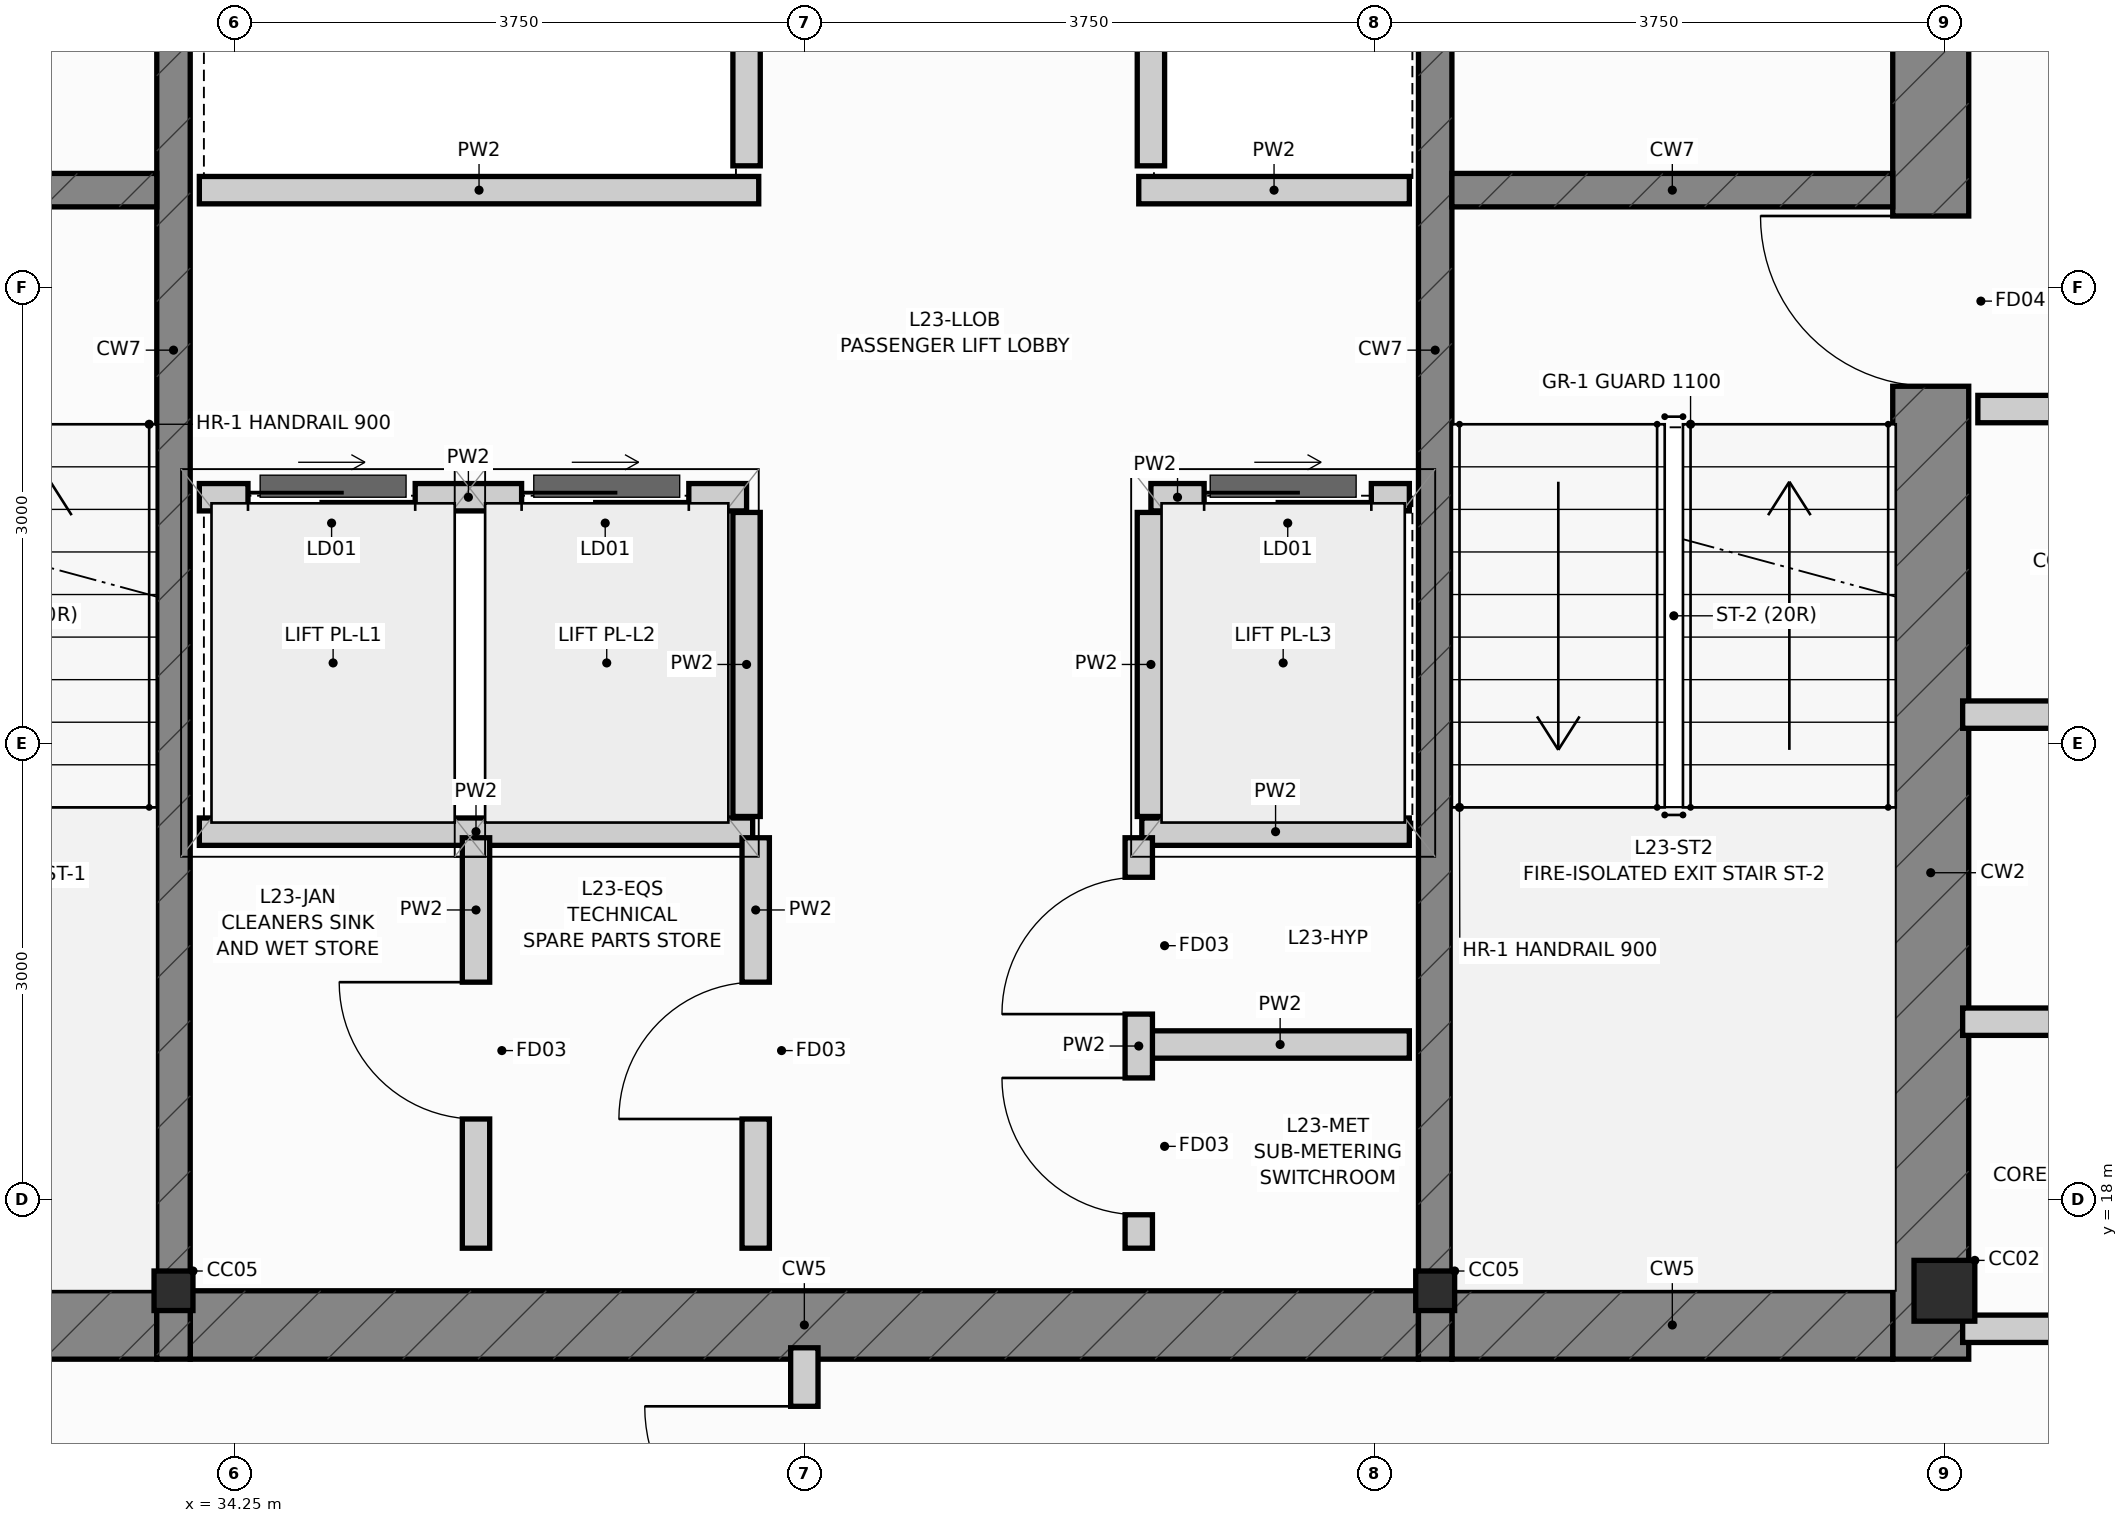
"""IFC4 building model, lengths in metres.
Left out: names, types, materials, properties, quantities, classifications, styles, units other than length and angle.
Written with IfcOpenShell. Run it as: python <this file> out.ifc"""

import sys

from ifc_helpers import new_model, si_unit, direction, frame, frame_2d, origin, origin_2d, place, context, subcontext, project, spatial, rectangle, i_section, extrude, source, transform, mapped, element, fill, save


model = new_model("IFC4")
c1 = context("Model", 3, precision=1e-05, world=origin(), true_north=direction((0.0, 1.0)))
c2 = subcontext(c1, "Body", "Model", "MODEL_VIEW")
j1 = project(units=[si_unit("LENGTHUNIT", "METRE"), si_unit("PLANEANGLEUNIT", "RADIAN")], contexts=[c1])
p1 = place(None, origin())
s1 = spatial("IfcSite", under=j1, at=p1, CompositionType="ELEMENT")
p2 = place(p1, origin())
s2 = spatial("IfcBuilding", under=s1, at=p2, CompositionType="ELEMENT")
p3 = place(p2, frame((0.0, 0.0, 112.7)))
s3 = spatial("IfcBuildingStorey", under=s2, at=p3, CompositionType="ELEMENT", Elevation=112.7)
m1 = source(origin(), c2, "Body", "SweptSolid", [
    extrude(i_section(OverallWidth=0.4, OverallDepth=0.4, WebThickness=0.02, FlangeThickness=0.032, at=origin_2d()), origin(), (0.0, 0.0, 1.0), 3.65),
])
p4 = place(p3, frame((45.5, 17.4, 0.0), z_axis=(0.0, 0.0, 1.0), x_axis=(1.0, 0.0, 0.0)))
e1 = element("IfcColumn", 1, at=p4, inside=s3, PredefinedType="COLUMN", context=c2, shape_type="MappedRepresentation", body=[
    mapped(m1, transform((0.0, 0.0, 0.0), scale=1.0)),
])
m2 = source(origin(), c2, "Body", "SweptSolid", [
    extrude(i_section(OverallWidth=0.256, OverallDepth=0.26, WebThickness=0.01, FlangeThickness=0.017, at=origin_2d()), origin(), (0.0, 0.0, 1.0), 3.65),
])
for number, where, z_axis, x_axis in (
    (2, (33.85, 17.4, 0.0), (0.0, 0.0, 1.0), (1.0, 0.0, 0.0)),
    (3, (42.15, 17.4, 0.0), (0.0, 0.0, 1.0), (1.0, 0.0, 0.0)),
):
    element("IfcColumn", number, at=place(p3, frame(where, z_axis=z_axis, x_axis=x_axis)), inside=s3, PredefinedType="COLUMN", context=c2, shape_type="MappedRepresentation", body=[
        mapped(m2, transform((0.0, 0.0, 0.0), scale=1.0)),
    ])
p5 = place(p3, frame((45.41, 16.95, 0.0), z_axis=(0.0, 0.0, 1.0), x_axis=(0.0, 1.0, 0.0)))
e4 = element("IfcWall", 4, at=p5, inside=s3, PredefinedType="SHEAR", context=c2, shape_type="SweptSolid", body=[
    extrude(rectangle(XDim=13.275, YDim=0.5, at=frame_2d((6.638, 0.0))), origin(), (0.0, 0.0, 1.0), 3.65),
])
p6 = place(p5, frame((6.4, 0.0, 0.0)))
e5 = element("IfcOpeningElement", 5, at=p6, cuts=e4, PredefinedType="OPENING", context=c2, shape_type="SweptSolid", body=[
    extrude(rectangle(XDim=1.12, YDim=2.15, at=frame_2d((0.56, 1.075))), frame((0.0, 0.262, 0.0), z_axis=(0.0, -1.0, 0.0), x_axis=(1.0, 0.0, 0.0)), (0.0, 0.0, 1.0), 0.524),
])
p7 = place(p5, frame((10.85, 0.0, 0.0)))
e6 = element("IfcOpeningElement", 6, at=p7, cuts=e4, PredefinedType="OPENING", context=c2, shape_type="SweptSolid", body=[
    extrude(rectangle(XDim=1.2, YDim=2.2, at=frame_2d((0.6, 1.1))), frame((0.0, 0.262, 0.0), z_axis=(0.0, -1.0, 0.0), x_axis=(1.0, 0.0, 0.0)), (0.0, 0.0, 1.0), 0.524),
])
p8 = place(p3, frame((30.84, 17.175, 0.0), z_axis=(0.0, 0.0, 1.0), x_axis=(1.0, 0.0, 0.0)))
e7 = element("IfcWall", 7, at=p8, inside=s3, PredefinedType="SHEAR", context=c2, shape_type="SweptSolid", body=[
    extrude(rectangle(XDim=2.9, YDim=0.45, at=frame_2d((1.45, 0.0))), origin(), (0.0, 0.0, 1.0), 3.65),
])
p9 = place(p3, frame((33.96, 17.175, 0.0), z_axis=(0.0, 0.0, 1.0), x_axis=(1.0, 0.0, 0.0)))
e8 = element("IfcWall", 8, at=p9, inside=s3, PredefinedType="SHEAR", context=c2, shape_type="SweptSolid", body=[
    extrude(rectangle(XDim=8.08, YDim=0.45, at=frame_2d((4.04, 0.0))), origin(), (0.0, 0.0, 1.0), 3.65),
])
p10 = place(p3, frame((42.26, 17.175, 0.0), z_axis=(0.0, 0.0, 1.0), x_axis=(1.0, 0.0, 0.0)))
e9 = element("IfcWall", 9, at=p10, inside=s3, PredefinedType="SHEAR", context=c2, shape_type="SweptSolid", body=[
    extrude(rectangle(XDim=2.9, YDim=0.45, at=frame_2d((1.45, 0.0))), origin(), (0.0, 0.0, 1.0), 3.65),
])
for number, where, z_axis, x_axis in (
    (10, (33.85, 16.95, 0.0), (0.0, 0.0, 1.0), (0.0, 1.0, 0.0)),
    (11, (42.15, 16.95, 0.0), (0.0, 0.0, 1.0), (0.0, 1.0, 0.0)),
):
    element("IfcWall", number, at=place(p3, frame(where, z_axis=z_axis, x_axis=x_axis)), inside=s3, PredefinedType="SHEAR", context=c2, shape_type="SweptSolid", body=[
        extrude(rectangle(XDim=13.275, YDim=0.22, at=frame_2d((6.638, 0.0))), origin(), (0.0, 0.0, 1.0), 3.65),
    ])
for number, where, z_axis, x_axis in (
    (12, (30.84, 24.64, 0.0), (0.0, 0.0, 1.0), (1.0, 0.0, 0.0)),
    (13, (42.26, 24.64, 0.0), (0.0, 0.0, 1.0), (1.0, 0.0, 0.0)),
):
    element("IfcWall", number, at=place(p3, frame(where, z_axis=z_axis, x_axis=x_axis)), inside=s3, PredefinedType="SHEAR", context=c2, shape_type="SweptSolid", body=[
        extrude(rectangle(XDim=2.9, YDim=0.22, at=frame_2d((1.45, 0.0))), origin(), (0.0, 0.0, 1.0), 3.65),
    ])
p11 = place(p3, frame((34.02, 22.62, 0.0), z_axis=(0.0, 0.0, 1.0), x_axis=(1.0, 0.0, 0.0)))
e14 = element("IfcWall", 14, at=p11, inside=s3, PredefinedType="PARTITIONING", context=c2, shape_type="SweptSolid", body=[
    extrude(rectangle(XDim=3.6, YDim=0.18, at=frame_2d((1.8, 0.0))), origin(), (0.0, 0.0, 1.0), 3.4),
])
p12 = place(p11, frame((0.32, 0.0, 0.0)))
e15 = element("IfcOpeningElement", 15, at=p12, cuts=e14, PredefinedType="OPENING", context=c2, shape_type="SweptSolid", body=[
    extrude(rectangle(XDim=1.1, YDim=2.2, at=frame_2d((0.55, 1.1))), frame((0.0, 0.102, 0.0), z_axis=(0.0, -1.0, 0.0), x_axis=(1.0, 0.0, 0.0)), (0.0, 0.0, 1.0), 0.204),
])
p13 = place(p11, frame((2.12, 0.0, 0.0)))
e16 = element("IfcOpeningElement", 16, at=p13, cuts=e14, PredefinedType="OPENING", context=c2, shape_type="SweptSolid", body=[
    extrude(rectangle(XDim=1.1, YDim=2.2, at=frame_2d((0.55, 1.1))), frame((0.0, 0.102, 0.0), z_axis=(0.0, -1.0, 0.0), x_axis=(1.0, 0.0, 0.0)), (0.0, 0.0, 1.0), 0.204),
])
p14 = place(p3, frame((40.28, 22.62, 0.0), z_axis=(0.0, 0.0, 1.0), x_axis=(1.0, 0.0, 0.0)))
e17 = element("IfcWall", 17, at=p14, inside=s3, PredefinedType="PARTITIONING", context=c2, shape_type="SweptSolid", body=[
    extrude(rectangle(XDim=1.7, YDim=0.18, at=frame_2d((0.85, 0.0))), origin(), (0.0, 0.0, 1.0), 3.4),
])
p15 = place(p14, frame((0.35, 0.0, 0.0)))
e18 = element("IfcOpeningElement", 18, at=p15, cuts=e17, PredefinedType="OPENING", context=c2, shape_type="SweptSolid", body=[
    extrude(rectangle(XDim=1.1, YDim=2.2, at=frame_2d((0.55, 1.1))), frame((0.0, 0.102, 0.0), z_axis=(0.0, -1.0, 0.0), x_axis=(1.0, 0.0, 0.0)), (0.0, 0.0, 1.0), 0.204),
])
for number, where, z_axis, x_axis in (
    (19, (37.62, 20.52, 0.0), (0.0, 0.0, 1.0), (0.0, 1.0, 0.0)),
    (20, (40.28, 20.52, 0.0), (0.0, 0.0, 1.0), (0.0, 1.0, 0.0)),
    (21, (37.62, 24.8, 0.0), (0.0, 0.0, 1.0), (0.0, 1.0, 0.0)),
    (22, (40.28, 24.8, 0.0), (0.0, 0.0, 1.0), (0.0, 1.0, 0.0)),
):
    element("IfcWall", number, at=place(p3, frame(where, z_axis=z_axis, x_axis=x_axis)), inside=s3, PredefinedType="PARTITIONING", context=c2, shape_type="SweptSolid", body=[
        extrude(rectangle(XDim=2.0, YDim=0.18, at=frame_2d((1.0, 0.0))), origin(), (0.0, 0.0, 1.0), 3.4),
    ])
p16 = place(p3, frame((34.02, 24.64, 0.0), z_axis=(0.0, 0.0, 1.0), x_axis=(1.0, 0.0, 0.0)))
e23 = element("IfcWall", 23, at=p16, inside=s3, PredefinedType="PARTITIONING", context=c2, shape_type="SweptSolid", body=[
    extrude(rectangle(XDim=3.68, YDim=0.18, at=frame_2d((1.84, 0.0))), origin(), (0.0, 0.0, 1.0), 3.4),
])
p17 = place(p3, frame((40.2, 24.64, 0.0), z_axis=(0.0, 0.0, 1.0), x_axis=(1.0, 0.0, 0.0)))
e24 = element("IfcWall", 24, at=p17, inside=s3, PredefinedType="PARTITIONING", context=c2, shape_type="SweptSolid", body=[
    extrude(rectangle(XDim=1.78, YDim=0.18, at=frame_2d((0.89, 0.0))), origin(), (0.0, 0.0, 1.0), 3.4),
])
p18 = place(p3, frame((45.72, 23.2, 0.0), z_axis=(0.0, 0.0, 1.0), x_axis=(1.0, 0.0, 0.0)))
e25 = element("IfcWall", 25, at=p18, inside=s3, PredefinedType="PARTITIONING", context=c2, shape_type="SweptSolid", body=[
    extrude(rectangle(XDim=2.76, YDim=0.18, at=frame_2d((1.38, 0.0))), origin(), (0.0, 0.0, 1.0), 3.4),
])
p19 = place(p3, frame((34.02, 20.42, 0.0), z_axis=(0.0, 0.0, 1.0), x_axis=(1.0, 0.0, 0.0)))
e26 = element("IfcWall", 26, at=p19, inside=s3, PredefinedType="PARTITIONING", context=c2, shape_type="SweptSolid", body=[
    extrude(rectangle(XDim=3.64, YDim=0.18, at=frame_2d((1.82, 0.0))), origin(), (0.0, 0.0, 1.0), 3.4),
])
p20 = place(p3, frame((40.22, 20.42, 0.0), z_axis=(0.0, 0.0, 1.0), x_axis=(1.0, 0.0, 0.0)))
e27 = element("IfcWall", 27, at=p20, inside=s3, PredefinedType="PARTITIONING", context=c2, shape_type="SweptSolid", body=[
    extrude(rectangle(XDim=1.76, YDim=0.18, at=frame_2d((0.88, 0.0))), origin(), (0.0, 0.0, 1.0), 3.4),
])
p21 = place(p3, frame((35.84, 17.68, 0.0), z_axis=(0.0, 0.0, 1.0), x_axis=(0.0, 1.0, 0.0)))
e28 = element("IfcWall", 28, at=p21, inside=s3, PredefinedType="PARTITIONING", context=c2, shape_type="SweptSolid", body=[
    extrude(rectangle(XDim=2.7, YDim=0.18, at=frame_2d((1.35, 0.0))), origin(), (0.0, 0.0, 1.0), 3.4),
])
p22 = place(p21, frame((0.85, 0.0, 0.0)))
e29 = element("IfcOpeningElement", 29, at=p22, cuts=e28, PredefinedType="OPENING", context=c2, shape_type="SweptSolid", body=[
    extrude(rectangle(XDim=0.9, YDim=2.1, at=frame_2d((0.45, 1.05))), frame((0.0, 0.102, 0.0), z_axis=(0.0, -1.0, 0.0), x_axis=(1.0, 0.0, 0.0)), (0.0, 0.0, 1.0), 0.204),
])
p23 = place(p3, frame((37.68, 17.68, 0.0), z_axis=(0.0, 0.0, 1.0), x_axis=(0.0, 1.0, 0.0)))
e30 = element("IfcWall", 30, at=p23, inside=s3, PredefinedType="PARTITIONING", context=c2, shape_type="SweptSolid", body=[
    extrude(rectangle(XDim=2.7, YDim=0.18, at=frame_2d((1.35, 0.0))), origin(), (0.0, 0.0, 1.0), 3.4),
])
p24 = place(p23, frame((0.85, 0.0, 0.0)))
e31 = element("IfcOpeningElement", 31, at=p24, cuts=e30, PredefinedType="OPENING", context=c2, shape_type="SweptSolid", body=[
    extrude(rectangle(XDim=0.9, YDim=2.1, at=frame_2d((0.45, 1.05))), frame((0.0, 0.102, 0.0), z_axis=(0.0, -1.0, 0.0), x_axis=(1.0, 0.0, 0.0)), (0.0, 0.0, 1.0), 0.204),
])
p25 = place(p3, frame((40.28, 19.02, 0.0), z_axis=(0.0, 0.0, 1.0), x_axis=(1.0, 0.0, 0.0)))
e32 = element("IfcWall", 32, at=p25, inside=s3, PredefinedType="PARTITIONING", context=c2, shape_type="SweptSolid", body=[
    extrude(rectangle(XDim=1.7, YDim=0.18, at=frame_2d((0.85, 0.0))), origin(), (0.0, 0.0, 1.0), 3.4),
])
p26 = place(p3, frame((40.2, 17.68, 0.0), z_axis=(0.0, 0.0, 1.0), x_axis=(0.0, 1.0, 0.0)))
e33 = element("IfcWall", 33, at=p26, inside=s3, PredefinedType="PARTITIONING", context=c2, shape_type="SweptSolid", body=[
    extrude(rectangle(XDim=2.7, YDim=0.18, at=frame_2d((1.35, 0.0))), origin(), (0.0, 0.0, 1.0), 3.4),
])
p27 = place(p26, frame((0.22, 0.0, 0.0)))
e34 = element("IfcOpeningElement", 34, at=p27, cuts=e33, PredefinedType="OPENING", context=c2, shape_type="SweptSolid", body=[
    extrude(rectangle(XDim=0.9, YDim=2.1, at=frame_2d((0.45, 1.05))), frame((0.0, 0.102, 0.0), z_axis=(0.0, -1.0, 0.0), x_axis=(1.0, 0.0, 0.0)), (0.0, 0.0, 1.0), 0.204),
])
p28 = place(p26, frame((1.54, 0.0, 0.0)))
e35 = element("IfcOpeningElement", 35, at=p28, cuts=e33, PredefinedType="OPENING", context=c2, shape_type="SweptSolid", body=[
    extrude(rectangle(XDim=0.9, YDim=2.1, at=frame_2d((0.45, 1.05))), frame((0.0, 0.102, 0.0), z_axis=(0.0, -1.0, 0.0), x_axis=(1.0, 0.0, 0.0)), (0.0, 0.0, 1.0), 0.204),
])
for number, where, z_axis, x_axis in (
    (36, (45.62, 19.17, 0.0), (0.0, 0.0, 1.0), (1.0, 0.0, 0.0)),
    (37, (45.62, 21.19, 0.0), (0.0, 0.0, 1.0), (1.0, 0.0, 0.0)),
):
    element("IfcWall", number, at=place(p3, frame(where, z_axis=z_axis, x_axis=x_axis)), inside=s3, PredefinedType="PARTITIONING", context=c2, shape_type="SweptSolid", body=[
        extrude(rectangle(XDim=2.9, YDim=0.18, at=frame_2d((1.45, 0.0))), origin(), (0.0, 0.0, 1.0), 3.4),
    ])
p29 = place(p3, frame((45.62, 17.15, 0.0), z_axis=(0.0, 0.0, 1.0), x_axis=(1.0, 0.0, 0.0)))
e38 = element("IfcWall", 38, at=p29, inside=s3, PredefinedType="PARTITIONING", context=c2, shape_type="SweptSolid", body=[
    extrude(rectangle(XDim=2.9, YDim=0.18, at=frame_2d((1.45, 0.0))), origin(), (0.0, 0.0, 1.0), 2.783),
])
p30 = place(p3, frame((38.0, 15.205, 0.0), z_axis=(0.0, 0.0, 1.0), x_axis=(0.0, 1.0, 0.0)))
e39 = element("IfcWall", 39, at=p30, inside=s3, PredefinedType="PARTITIONING", context=c2, shape_type="SweptSolid", body=[
    extrude(rectangle(XDim=1.82, YDim=0.18, at=frame_2d((0.91, 0.0))), origin(), (0.0, 0.0, 1.0), 3.4),
])
p31 = place(p30, frame((0.385, 0.0, 0.0)))
e40 = element("IfcOpeningElement", 40, at=p31, cuts=e39, PredefinedType="OPENING", context=c2, shape_type="SweptSolid", body=[
    extrude(rectangle(XDim=1.05, YDim=2.15, at=frame_2d((0.525, 1.075))), frame((0.0, 0.102, 0.0), z_axis=(0.0, -1.0, 0.0), x_axis=(1.0, 0.0, 0.0)), (0.0, 0.0, 1.0), 0.204),
])
p32 = place(p6, origin())
e41 = element("IfcDoor", 41, at=p32, inside=s3, OperationType="SINGLE_SWING_RIGHT", PredefinedType="DOOR", context=c2, shape_type="SweptSolid", body=[
    extrude(rectangle(XDim=1.12, YDim=2.15, at=frame_2d((0.56, 1.075))), frame((0.0, 0.025, 0.0), z_axis=(0.0, -1.0, 0.0), x_axis=(1.0, 0.0, 0.0)), (0.0, 0.0, 1.0), 0.05),
])
fill(e5, e41)
p33 = place(p12, origin())
e42 = element("IfcDoor", 42, at=p33, inside=s3, OperationType="SLIDING_TO_LEFT", PredefinedType="DOOR", context=c2, shape_type="SweptSolid", body=[
    extrude(rectangle(XDim=1.1, YDim=2.2, at=frame_2d((0.55, 1.1))), frame((0.0, 0.025, 0.0), z_axis=(0.0, -1.0, 0.0), x_axis=(1.0, 0.0, 0.0)), (0.0, 0.0, 1.0), 0.05),
])
fill(e15, e42)
p34 = place(p13, origin())
e43 = element("IfcDoor", 43, at=p34, inside=s3, OperationType="SLIDING_TO_RIGHT", PredefinedType="DOOR", context=c2, shape_type="SweptSolid", body=[
    extrude(rectangle(XDim=1.1, YDim=2.2, at=frame_2d((0.55, 1.1))), frame((0.0, 0.025, 0.0), z_axis=(0.0, -1.0, 0.0), x_axis=(1.0, 0.0, 0.0)), (0.0, 0.0, 1.0), 0.05),
])
fill(e16, e43)
p35 = place(p15, origin())
e44 = element("IfcDoor", 44, at=p35, inside=s3, OperationType="SLIDING_TO_LEFT", PredefinedType="DOOR", context=c2, shape_type="SweptSolid", body=[
    extrude(rectangle(XDim=1.1, YDim=2.2, at=frame_2d((0.55, 1.1))), frame((0.0, 0.025, 0.0), z_axis=(0.0, -1.0, 0.0), x_axis=(1.0, 0.0, 0.0)), (0.0, 0.0, 1.0), 0.05),
])
fill(e18, e44)
p36 = place(p22, origin())
e45 = element("IfcDoor", 45, at=p36, inside=s3, OperationType="SINGLE_SWING_RIGHT", PredefinedType="DOOR", context=c2, shape_type="SweptSolid", body=[
    extrude(rectangle(XDim=0.9, YDim=2.1, at=frame_2d((0.45, 1.05))), frame((0.0, 0.025, 0.0), z_axis=(0.0, -1.0, 0.0), x_axis=(1.0, 0.0, 0.0)), (0.0, 0.0, 1.0), 0.05),
])
fill(e29, e45)
p37 = place(p24, origin())
e46 = element("IfcDoor", 46, at=p37, inside=s3, OperationType="SINGLE_SWING_LEFT", PredefinedType="DOOR", context=c2, shape_type="SweptSolid", body=[
    extrude(rectangle(XDim=0.9, YDim=2.1, at=frame_2d((0.45, 1.05))), frame((0.0, 0.025, 0.0), z_axis=(0.0, -1.0, 0.0), x_axis=(1.0, 0.0, 0.0)), (0.0, 0.0, 1.0), 0.05),
])
fill(e31, e46)
p38 = place(p27, origin())
e47 = element("IfcDoor", 47, at=p38, inside=s3, OperationType="SINGLE_SWING_RIGHT", PredefinedType="DOOR", context=c2, shape_type="SweptSolid", body=[
    extrude(rectangle(XDim=0.9, YDim=2.1, at=frame_2d((0.45, 1.05))), frame((0.0, 0.025, 0.0), z_axis=(0.0, -1.0, 0.0), x_axis=(1.0, 0.0, 0.0)), (0.0, 0.0, 1.0), 0.05),
])
fill(e34, e47)
p39 = place(p28, origin())
e48 = element("IfcDoor", 48, at=p39, inside=s3, OperationType="SINGLE_SWING_LEFT", PredefinedType="DOOR", context=c2, shape_type="SweptSolid", body=[
    extrude(rectangle(XDim=0.9, YDim=2.1, at=frame_2d((0.45, 1.05))), frame((0.0, 0.025, 0.0), z_axis=(0.0, -1.0, 0.0), x_axis=(1.0, 0.0, 0.0)), (0.0, 0.0, 1.0), 0.05),
])
fill(e35, e48)
p40 = place(p31, origin())
e49 = element("IfcDoor", 49, at=p40, inside=s3, OperationType="SINGLE_SWING_RIGHT", PredefinedType="DOOR", context=c2, shape_type="SweptSolid", body=[
    extrude(rectangle(XDim=1.05, YDim=2.15, at=frame_2d((0.525, 1.075))), frame((0.0, 0.025, 0.0), z_axis=(0.0, -1.0, 0.0), x_axis=(1.0, 0.0, 0.0)), (0.0, 0.0, 1.0), 0.05),
])
fill(e40, e49)
save(model, sys.argv[1])
